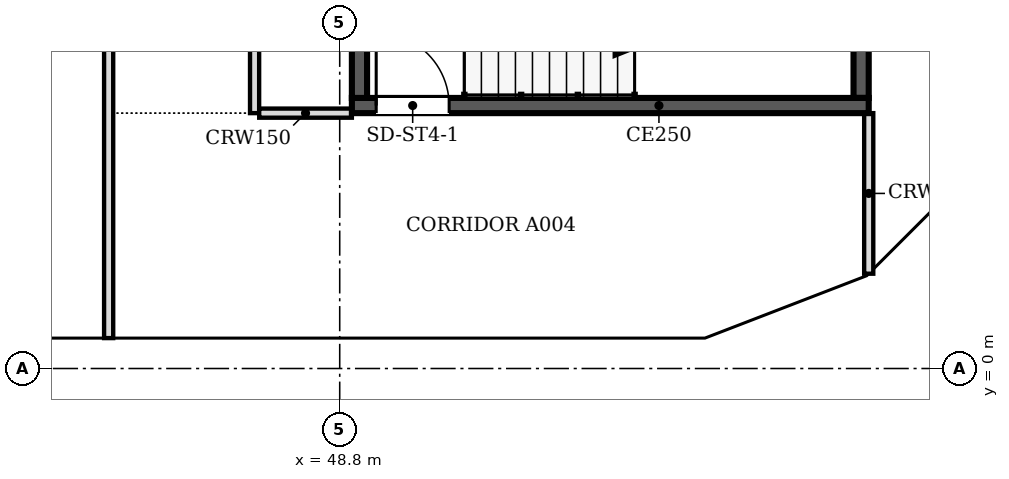
"""IFC4 building model, lengths in metres.
Left out: names, types, materials, properties, quantities, classifications, styles, units other than length and angle.
Written with IfcOpenShell. Run it as: python <this file> out.ifc"""

import sys

from ifc_helpers import new_model, si_unit, direction, frame, frame_2d, origin, place, context, subcontext, project, spatial, polyline, rectangle, outline, extrude, faceted_brep, source, transform, mapped, element, fill, save


model = new_model("IFC4")
c1 = context("Model", 3, precision=1e-05, world=origin(), true_north=direction((0.0, 1.0)))
c2 = subcontext(c1, "Body", "Model", "MODEL_VIEW")
j1 = project(units=[si_unit("LENGTHUNIT", "METRE"), si_unit("PLANEANGLEUNIT", "RADIAN")], contexts=[c1])
p1 = place(None, origin())
s1 = spatial("IfcSite", under=j1, at=p1, CompositionType="ELEMENT")
p2 = place(p1, origin())
s2 = spatial("IfcBuilding", under=s1, at=p2, CompositionType="ELEMENT")
p3 = place(p2, frame((0.0, 0.0, 166.8)))
s3 = spatial("IfcBuildingStorey", under=s2, at=p3, CompositionType="ELEMENT", Elevation=166.8)
m1 = source(origin(), c2, "Body", "SweptSolid", [
    extrude(outline(polyline([(3.05, 0.0), (6.1, 3.8), (3.05, 7.6), (0.0, 3.8), (3.05, 0.0)])), frame((0.0, 0.25, 0.0), z_axis=(0.0, -1.0, 0.0), x_axis=(1.0, 0.0, 0.0)), (0.0, 0.0, 1.0), 0.5),
])
p4 = place(p3, frame((42.7, 0.25, -3.8), z_axis=(0.0, 0.0, 1.0), x_axis=(1.0, 0.0, 0.0)))
e1 = element("IfcWall", 1, at=p4, inside=s3, PredefinedType="SOLIDWALL", context=c2, shape_type="MappedRepresentation", body=[
    mapped(m1, transform((0.0, 0.0, 0.0), scale=1.0)),
])
m2 = source(origin(), c2, "Body", "SweptSolid", [
    extrude(outline(polyline([(3.05, 0.399), (5.78, 3.8), (3.05, 7.201), (0.321, 3.8), (3.05, 0.399)])), frame((0.0, 0.26, 0.0), z_axis=(0.0, -1.0, 0.0), x_axis=(1.0, 0.0, 0.0)), (0.0, 0.0, 1.0), 0.52),
])
p5 = place(p4, origin())
e2 = element("IfcOpeningElement", 2, at=p5, cuts=e1, PredefinedType="OPENING", context=c2, shape_type="MappedRepresentation", body=[
    mapped(m2, transform((0.0, 0.0, 0.0), scale=1.0)),
])
m3 = source(origin(), c2, "Body", "Brep", [
    faceted_brep([(3.05, -0.25, 0.0), (6.053, -0.25, 3.8), (3.05, -0.25, 7.6), (0.0, -0.25, 3.8), (0.0, 0.25, 3.8), (3.05, 0.25, 7.6), (6.007, 0.25, 3.859), (6.007, 0.25, 3.741), (3.05, 0.25, 0.0), (6.053, 0.0, 3.8)], [[[0, 1, 2, 3]], [[4, 5, 6, 7, 8]], [[8, 7, 9, 1, 0]], [[6, 5, 2, 1, 9]], [[5, 4, 3, 2]], [[4, 8, 0, 3]], [[9, 7, 6]]]),
])
p6 = place(p3, frame((48.8, 0.25, -3.8), z_axis=(0.0, 0.0, 1.0), x_axis=(1.0, 0.0, 0.0)))
e3 = element("IfcWall", 3, at=p6, inside=s3, PredefinedType="SOLIDWALL", context=c2, shape_type="MappedRepresentation", body=[
    mapped(m3, transform((0.0, 0.0, 0.0), scale=1.0)),
])
m4 = source(origin(), c2, "Body", "SweptSolid", [
    extrude(outline(polyline([(3.049, 0.401), (5.735, 3.8), (3.049, 7.199), (0.321, 3.8), (3.049, 0.401)])), frame((0.0, 0.26, 0.0), z_axis=(0.0, -1.0, 0.0), x_axis=(1.0, 0.0, 0.0)), (0.0, 0.0, 1.0), 0.52),
])
p7 = place(p6, origin())
e4 = element("IfcOpeningElement", 4, at=p7, cuts=e3, PredefinedType="OPENING", context=c2, shape_type="MappedRepresentation", body=[
    mapped(m4, transform((0.0, 0.0, 0.0), scale=1.0)),
])
m5 = source(origin(), c2, "Body", "Brep", [
    faceted_brep([(2.95, -0.25, 0.0), (3.003, -0.25, 0.068), (3.003, -0.25, 7.532), (2.95, -0.25, 7.6), (0.0, -0.25, 3.8), (0.047, 0.25, 3.86), (2.898, 0.25, 7.532), (2.898, 0.25, 0.068), (0.047, 0.25, 3.74), (2.95, 0.0, 0.0), (2.95, 0.0, 7.6), (0.0, 0.0, 3.8)], [[[0, 1, 2, 3, 4]], [[5, 6, 7, 8]], [[1, 0, 9]], [[10, 3, 2]], [[6, 5, 11, 4, 3, 10]], [[8, 7, 9, 0, 4, 11]], [[8, 11, 5]], [[1, 9, 7, 6, 10, 2]]]),
])
p8 = place(p3, frame((54.854, 0.25, -3.8), z_axis=(0.0, 0.0, 1.0), x_axis=(0.932970071518, 0.359953949349, 0.0)))
e5 = element("IfcWall", 5, at=p8, inside=s3, PredefinedType="SOLIDWALL", context=c2, shape_type="MappedRepresentation", body=[
    mapped(m5, transform((0.0, 0.0, 0.0), scale=1.0)),
])
m6 = source(origin(), c2, "Body", "SweptSolid", [
    extrude(outline(polyline([(2.75, 6.935), (0.316, 3.8), (2.75, 0.665), (2.75, 6.935)])), frame((0.0, 0.26, 0.0), z_axis=(0.0, -1.0, 0.0), x_axis=(1.0, 0.0, 0.0)), (0.0, 0.0, 1.0), 0.52),
])
p9 = place(p8, origin())
e6 = element("IfcOpeningElement", 6, at=p9, cuts=e5, PredefinedType="OPENING", context=c2, shape_type="MappedRepresentation", body=[
    mapped(m6, transform((0.0, 0.0, 0.0), scale=1.0)),
])
m7 = source(origin(), c2, "Body", "Brep", [
    faceted_brep([(0.053, -0.25, 0.0), (2.997, -0.25, 3.8), (0.053, -0.25, 7.6), (0.0, -0.25, 7.532), (0.0, -0.25, 0.068), (0.106, 0.25, 7.532), (2.944, 0.25, 3.868), (2.944, 0.25, 3.732), (0.106, 0.25, 0.068), (2.997, 0.0, 3.8), (0.053, 0.0, 0.0), (0.053, 0.0, 7.6)], [[[0, 1, 2, 3, 4]], [[5, 6, 7, 8]], [[8, 7, 9, 1, 0, 10]], [[6, 5, 11, 2, 1, 9]], [[3, 2, 11]], [[10, 0, 4]], [[8, 10, 4, 3, 11, 5]], [[9, 7, 6]]]),
])
p10 = place(p3, frame((57.569, 1.274, -3.8), z_axis=(0.0, 0.0, 1.0), x_axis=(0.707066050402, 0.707147509625, 0.0)))
e7 = element("IfcWall", 7, at=p10, inside=s3, PredefinedType="SOLIDWALL", context=c2, shape_type="MappedRepresentation", body=[
    mapped(m7, transform((0.0, 0.0, 0.0), scale=1.0)),
])
m8 = source(origin(), c2, "Body", "SweptSolid", [
    extrude(outline(polyline([(0.253, 0.666), (2.681, 3.8), (0.253, 6.934), (0.253, 0.666)])), frame((0.0, 0.26, 0.0), z_axis=(0.0, -1.0, 0.0), x_axis=(1.0, 0.0, 0.0)), (0.0, 0.0, 1.0), 0.52),
])
p11 = place(p10, origin())
e8 = element("IfcOpeningElement", 8, at=p11, cuts=e7, PredefinedType="OPENING", context=c2, shape_type="MappedRepresentation", body=[
    mapped(m8, transform((0.0, 0.0, 0.0), scale=1.0)),
])
p12 = place(p2, frame((0.0, 0.0, 170.6)))
s4 = spatial("IfcBuildingStorey", under=s2, at=p12, CompositionType="ELEMENT", Elevation=170.6)
m9 = source(origin(), c2, "Body", "SweptSolid", [
    extrude(outline(polyline([(3.05, 0.0), (6.1, 3.8), (3.05, 7.6), (0.0, 3.8), (3.05, 0.0)])), frame((0.0, 0.25, 0.0), z_axis=(0.0, -1.0, 0.0), x_axis=(1.0, 0.0, 0.0)), (0.0, 0.0, 1.0), 0.5),
])
p13 = place(p12, frame((39.65, 0.25, -3.8), z_axis=(0.0, 0.0, 1.0), x_axis=(1.0, 0.0, 0.0)))
e9 = element("IfcWall", 9, at=p13, inside=s4, PredefinedType="SOLIDWALL", context=c2, shape_type="MappedRepresentation", body=[
    mapped(m9, transform((0.0, 0.0, 0.0), scale=1.0)),
])
m10 = source(origin(), c2, "Body", "SweptSolid", [
    extrude(outline(polyline([(3.05, 0.399), (5.78, 3.8), (3.05, 7.2), (0.321, 3.8), (3.05, 0.399)])), frame((0.0, 0.26, 0.0), z_axis=(0.0, -1.0, 0.0), x_axis=(1.0, 0.0, 0.0)), (0.0, 0.0, 1.0), 0.52),
])
p14 = place(p13, origin())
e10 = element("IfcOpeningElement", 10, at=p14, cuts=e9, PredefinedType="OPENING", context=c2, shape_type="MappedRepresentation", body=[
    mapped(m10, transform((0.0, 0.0, 0.0), scale=1.0)),
])
p15 = place(p12, frame((45.75, 0.25, -3.8), z_axis=(0.0, 0.0, 1.0), x_axis=(1.0, 0.0, 0.0)))
e11 = element("IfcWall", 11, at=p15, inside=s4, PredefinedType="SOLIDWALL", context=c2, shape_type="MappedRepresentation", body=[
    mapped(m9, transform((0.0, 0.0, 0.0), scale=1.0)),
])
p16 = place(p15, origin())
e12 = element("IfcOpeningElement", 12, at=p16, cuts=e11, PredefinedType="OPENING", context=c2, shape_type="MappedRepresentation", body=[
    mapped(m10, transform((0.0, 0.0, 0.0), scale=1.0)),
])
m11 = source(origin(), c2, "Body", "Brep", [
    faceted_brep([(3.003, -0.25, 0.0), (3.05, -0.25, 0.06), (3.05, -0.25, 7.54), (3.003, -0.25, 7.6), (0.0, -0.25, 3.8), (0.0, 0.25, 3.8), (2.957, 0.25, 7.541), (2.957, 0.25, 0.059), (3.003, 0.0, 0.0), (3.003, 0.0, 7.6)], [[[0, 1, 2, 3, 4]], [[5, 6, 7]], [[1, 0, 8]], [[9, 3, 2]], [[6, 5, 4, 3, 9]], [[5, 7, 8, 0, 4]], [[1, 8, 7, 6, 9, 2]]]),
])
p17 = place(p12, frame((51.85, 0.25, -3.8), z_axis=(0.0, 0.0, 1.0), x_axis=(1.0, 0.0, 0.0)))
e13 = element("IfcWall", 13, at=p17, inside=s4, PredefinedType="SOLIDWALL", context=c2, shape_type="MappedRepresentation", body=[
    mapped(m11, transform((0.0, 0.0, 0.0), scale=1.0)),
])
m12 = source(origin(), c2, "Body", "SweptSolid", [
    extrude(outline(polyline([(2.803, 6.944), (0.319, 3.8), (2.803, 0.656), (2.803, 6.944)])), frame((0.0, 0.26, 0.0), z_axis=(0.0, -1.0, 0.0), x_axis=(1.0, 0.0, 0.0)), (0.0, 0.0, 1.0), 0.52),
])
p18 = place(p17, origin())
e14 = element("IfcOpeningElement", 14, at=p18, cuts=e13, PredefinedType="OPENING", context=c2, shape_type="MappedRepresentation", body=[
    mapped(m12, transform((0.0, 0.0, 0.0), scale=1.0)),
])
m13 = source(origin(), c2, "Body", "Brep", [
    faceted_brep([(0.047, -0.25, 0.0), (2.997, -0.25, 3.8), (0.047, -0.25, 7.6), (0.0, -0.25, 7.541), (0.0, -0.25, 0.059), (0.093, 0.25, 7.54), (2.944, 0.25, 3.868), (2.944, 0.25, 3.732), (0.093, 0.25, 0.06), (2.997, 0.0, 3.8), (0.047, 0.0, 0.0), (0.047, 0.0, 7.6)], [[[0, 1, 2, 3, 4]], [[5, 6, 7, 8]], [[8, 7, 9, 1, 0, 10]], [[6, 5, 11, 2, 1, 9]], [[3, 2, 11]], [[10, 0, 4]], [[8, 10, 4, 3, 11, 5]], [[7, 6, 9]]]),
])
p19 = place(p12, frame((54.81, 0.233, -3.8), z_axis=(0.0, 0.0, 1.0), x_axis=(0.932990326376, 0.359901446078, 0.0)))
e15 = element("IfcWall", 15, at=p19, inside=s4, PredefinedType="SOLIDWALL", context=c2, shape_type="MappedRepresentation", body=[
    mapped(m13, transform((0.0, 0.0, 0.0), scale=1.0)),
])
m14 = source(origin(), c2, "Body", "SweptSolid", [
    extrude(outline(polyline([(0.247, 0.665), (2.681, 3.8), (0.247, 6.935), (0.247, 0.665)])), frame((0.0, 0.26, 0.0), z_axis=(0.0, -1.0, 0.0), x_axis=(1.0, 0.0, 0.0)), (0.0, 0.0, 1.0), 0.52),
])
p20 = place(p19, origin())
e16 = element("IfcOpeningElement", 16, at=p20, cuts=e15, PredefinedType="OPENING", context=c2, shape_type="MappedRepresentation", body=[
    mapped(m14, transform((0.0, 0.0, 0.0), scale=1.0)),
])
m15 = source(origin(), c2, "Body", "Brep", [
    faceted_brep([(2.944, -0.25, 0.0), (2.997, -0.25, 0.068), (2.997, -0.25, 7.532), (2.944, -0.25, 7.6), (0.0, -0.25, 3.8), (0.053, 0.25, 3.868), (2.891, 0.25, 7.532), (2.891, 0.25, 0.068), (0.053, 0.25, 3.732), (2.944, 0.0, 0.0), (2.944, 0.0, 7.6), (0.0, 0.0, 3.8)], [[[0, 1, 2, 3, 4]], [[5, 6, 7, 8]], [[1, 0, 9]], [[10, 3, 2]], [[6, 5, 11, 4, 3, 10]], [[8, 7, 9, 0, 4, 11]], [[8, 11, 5]], [[1, 9, 7, 6, 10, 2]]]),
])
p21 = place(p12, frame((57.606, 1.312, -3.8), z_axis=(0.0, 0.0, 1.0), x_axis=(0.707147509625, 0.707066050402, 0.0)))
e17 = element("IfcWall", 17, at=p21, inside=s4, PredefinedType="SOLIDWALL", context=c2, shape_type="MappedRepresentation", body=[
    mapped(m15, transform((0.0, 0.0, 0.0), scale=1.0)),
])
m16 = source(origin(), c2, "Body", "SweptSolid", [
    extrude(outline(polyline([(2.744, 6.934), (0.316, 3.8), (2.744, 0.666), (2.744, 6.934)])), frame((0.0, 0.26, 0.0), z_axis=(0.0, -1.0, 0.0), x_axis=(1.0, 0.0, 0.0)), (0.0, 0.0, 1.0), 0.52),
])
p22 = place(p21, origin())
e18 = element("IfcOpeningElement", 18, at=p22, cuts=e17, PredefinedType="OPENING", context=c2, shape_type="MappedRepresentation", body=[
    mapped(m16, transform((0.0, 0.0, 0.0), scale=1.0)),
])
p23 = place(p3, frame((57.5, 4.325, 0.0), z_axis=(0.0, 0.0, 1.0), x_axis=(-1.0, 0.0, 0.0)))
e19 = element("IfcWall", 19, at=p23, inside=s3, PredefinedType="SOLIDWALL", context=c2, shape_type="SweptSolid", body=[
    extrude(rectangle(XDim=8.5, YDim=0.25, at=frame_2d((4.25, 0.0))), origin(), (0.0, 0.0, 1.0), 3.8),
])
m17 = source(origin(), c2, "Body", "SweptSolid", [
    extrude(rectangle(XDim=1.2, YDim=2.1, at=frame_2d((0.6, 1.05))), frame((0.0, 0.135, 0.0), z_axis=(0.0, -1.0, 0.0), x_axis=(1.0, 0.0, 0.0)), (0.0, 0.0, 1.0), 0.27),
])
p24 = place(p23, frame((6.9, 0.0, 0.0)))
e20 = element("IfcOpeningElement", 20, at=p24, cuts=e19, PredefinedType="OPENING", context=c2, shape_type="MappedRepresentation", body=[
    mapped(m17, transform((0.0, 0.0, 0.0), scale=1.0)),
])
for number, where, z_axis, x_axis in (
    (21, (49.125, 4.45, 0.0), (0.0, 0.0, 1.0), (0.0, 1.0, 0.0)),
    (22, (57.375, 7.85, 0.0), (0.0, 0.0, 1.0), (0.0, -1.0, 0.0)),
):
    element("IfcWall", number, at=place(p3, frame(where, z_axis=z_axis, x_axis=x_axis)), inside=s3, PredefinedType="SOLIDWALL", context=c2, shape_type="SweptSolid", body=[
        extrude(rectangle(XDim=3.4, YDim=0.25, at=frame_2d((1.7, 0.0))), origin(), (0.0, 0.0, 1.0), 3.8),
    ])
p25 = place(p3, frame((45.0, 0.5, 0.0), z_axis=(0.0, 0.0, 1.0), x_axis=(0.0, 1.0, 0.0)))
e23 = element("IfcWall", 23, at=p25, inside=s3, PredefinedType="PARTITIONING", context=c2, shape_type="SweptSolid", body=[
    extrude(rectangle(XDim=21.724, YDim=0.15, at=frame_2d((10.862, 0.0))), origin(), (0.0, 0.0, 1.0), 3.067),
])
m18 = source(origin(), c2, "Body", "SweptSolid", [
    extrude(rectangle(XDim=1.0, YDim=2.1, at=frame_2d((0.5, 1.05))), frame((0.0, 0.085, 0.0), z_axis=(0.0, -1.0, 0.0), x_axis=(1.0, 0.0, 0.0)), (0.0, 0.0, 1.0), 0.17),
])
p26 = place(p25, frame((6.2, 0.0, 0.0)))
e24 = element("IfcOpeningElement", 24, at=p26, cuts=e23, PredefinedType="OPENING", context=c2, shape_type="MappedRepresentation", body=[
    mapped(m18, transform((0.0, 0.0, 0.0), scale=1.0)),
])
m19 = source(origin(), c2, "Body", "SweptSolid", [
    extrude(rectangle(XDim=0.9, YDim=2.1, at=frame_2d((0.45, 1.05))), frame((0.0, 0.085, 0.0), z_axis=(0.0, -1.0, 0.0), x_axis=(1.0, 0.0, 0.0)), (0.0, 0.0, 1.0), 0.17),
])
p27 = place(p25, frame((15.3, 0.0, 0.0)))
e25 = element("IfcOpeningElement", 25, at=p27, cuts=e23, PredefinedType="OPENING", context=c2, shape_type="MappedRepresentation", body=[
    mapped(m19, transform((0.0, 0.0, 0.0), scale=1.0)),
])
p28 = place(p3, frame((57.5, 1.559, 0.0), z_axis=(0.0, 0.0, 1.0), x_axis=(0.0, 1.0, 0.0)))
e26 = element("IfcWall", 26, at=p28, inside=s3, PredefinedType="PARTITIONING", context=c2, shape_type="SweptSolid", body=[
    extrude(rectangle(XDim=2.641, YDim=0.15, at=frame_2d((1.32, 0.0))), origin(), (0.0, 0.0, 1.0), 3.067),
])
p29 = place(p3, frame((47.4, 22.224, 0.0), z_axis=(0.0, 0.0, 1.0), x_axis=(0.0, -1.0, 0.0)))
e27 = element("IfcWall", 27, at=p29, inside=s3, PredefinedType="PARTITIONING", context=c2, shape_type="SweptSolid", body=[
    extrude(rectangle(XDim=18.024, YDim=0.15, at=frame_2d((9.012, 0.0))), origin(), (0.0, 0.0, 1.0), 3.067),
])
p30 = place(p29, frame((2.123, 0.0, 0.0)))
e28 = element("IfcOpeningElement", 28, at=p30, cuts=e27, PredefinedType="OPENING", context=c2, shape_type="MappedRepresentation", body=[
    mapped(m19, transform((0.0, 0.0, 0.0), scale=1.0)),
])
p31 = place(p29, frame((11.124, 0.0, 0.0)))
e29 = element("IfcOpeningElement", 29, at=p31, cuts=e27, PredefinedType="OPENING", context=c2, shape_type="MappedRepresentation", body=[
    mapped(m19, transform((0.0, 0.0, 0.0), scale=1.0)),
])
p32 = place(p3, frame((47.476, 4.2, 0.0), z_axis=(0.0, 0.0, 1.0), x_axis=(1.0, 0.0, 0.0)))
e30 = element("IfcWall", 30, at=p32, inside=s3, PredefinedType="PARTITIONING", context=c2, shape_type="SweptSolid", body=[
    extrude(rectangle(XDim=1.524, YDim=0.15, at=frame_2d((0.762, 0.0))), origin(), (0.0, 0.0, 1.0), 3.067),
])
m20 = source(origin(), c2, "Body", "SweptSolid", [
    extrude(rectangle(XDim=1.2, YDim=2.1, at=frame_2d((0.6, 1.05))), frame((0.0, 0.025, 0.0), z_axis=(0.0, -1.0, 0.0), x_axis=(1.0, 0.0, 0.0)), (0.0, 0.0, 1.0), 0.05),
])
p33 = place(p24, origin())
e31 = element("IfcDoor", 31, at=p33, inside=s3, OperationType="SINGLE_SWING_RIGHT", PredefinedType="DOOR", context=c2, shape_type="MappedRepresentation", body=[
    mapped(m20, transform((0.0, 0.0, 0.0), scale=1.0)),
])
fill(e20, e31)
save(model, sys.argv[1])
